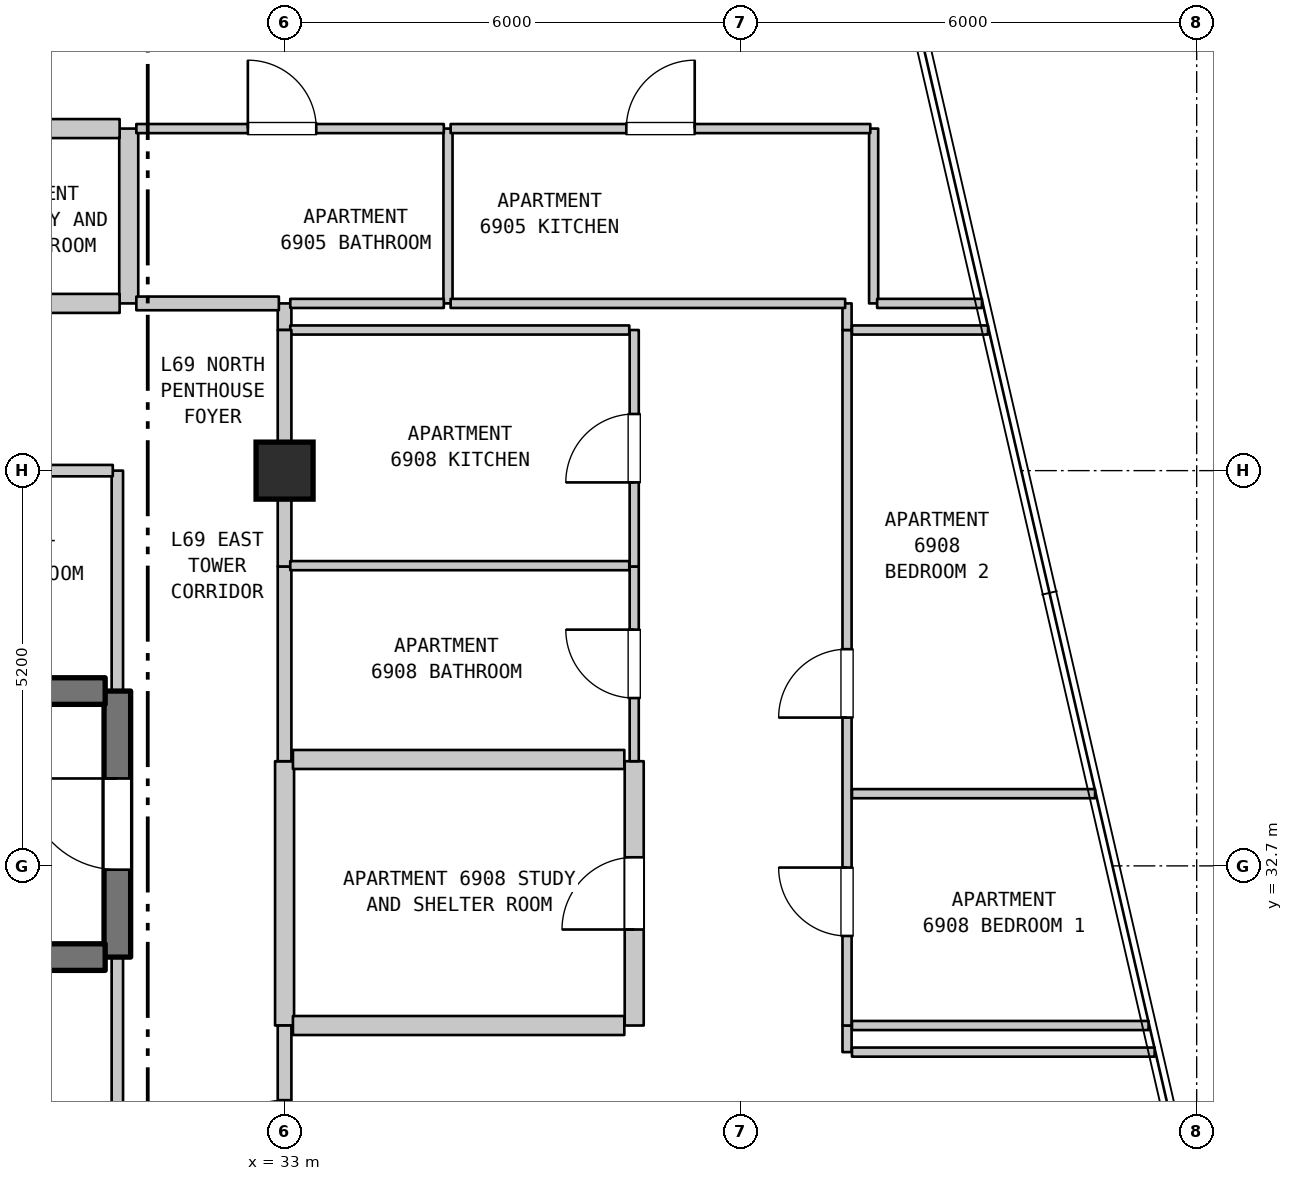
"""IFC4 building model, lengths in metres.
Left out: names, types, materials, properties, quantities, classifications, styles, units other than length and angle.
Written with IfcOpenShell. Run it as: python <this file> out.ifc"""

import sys

from ifc_helpers import new_model, si_unit, direction, frame, frame_2d, origin, origin_2d, place, context, subcontext, project, spatial, rectangle, extrude, element, fill, save


model = new_model("IFC4")
c1 = context("Model", 3, precision=1e-05, world=origin(), true_north=direction((0.0, 1.0)))
c2 = subcontext(c1, "Body", "Model", "MODEL_VIEW")
j1 = project(units=[si_unit("LENGTHUNIT", "METRE"), si_unit("PLANEANGLEUNIT", "RADIAN")], contexts=[c1])
p1 = place(None, origin())
s1 = spatial("IfcSite", under=j1, at=p1, CompositionType="ELEMENT")
p2 = place(p1, origin())
s2 = spatial("IfcBuilding", under=s1, at=p2, CompositionType="ELEMENT")
p3 = place(p2, frame((0.0, 0.0, 276.9)))
s3 = spatial("IfcBuildingStorey", under=s2, at=p3, CompositionType="ELEMENT", Elevation=276.9)
p4 = place(p3, frame((33.0, 37.9, 0.0), z_axis=(0.0, 0.0, 1.0), x_axis=(1.0, 0.0, 0.0)))
e1 = element("IfcColumn", 1, at=p4, inside=s3, PredefinedType="COLUMN", context=c2, shape_type="SweptSolid", body=[
    extrude(rectangle(XDim=0.75, YDim=0.75, at=origin_2d()), origin(), (0.0, 0.0, 1.0), 3.7),
])
p5 = place(p3, frame((30.8, 28.9, 0.0), z_axis=(0.0, 0.0, 1.0), x_axis=(0.0, 1.0, 0.0)))
e2 = element("IfcWall", 2, at=p5, inside=s3, PredefinedType="STANDARD", context=c2, shape_type="SweptSolid", body=[
    extrude(rectangle(XDim=2.6, YDim=0.15, at=frame_2d((1.3, 0.0))), origin(), (0.0, 0.0, 1.0), 3.39),
])
p6 = place(p3, frame((30.8, 31.5, 0.0), z_axis=(0.0, 0.0, 1.0), x_axis=(0.0, 1.0, 0.0)))
e3 = element("IfcWall", 3, at=p6, inside=s3, PredefinedType="SHEAR", context=c2, shape_type="SweptSolid", body=[
    extrude(rectangle(XDim=3.5, YDim=0.35, at=frame_2d((1.75, 0.0))), origin(), (0.0, 0.0, 1.0), 3.39),
])
p7 = place(p6, frame((1.15, 0.0, 0.0)))
e4 = element("IfcOpeningElement", 4, at=p7, cuts=e3, PredefinedType="OPENING", context=c2, shape_type="SweptSolid", body=[
    extrude(rectangle(XDim=1.2, YDim=2.2, at=frame_2d((0.6, 1.1))), frame((0.0, 0.185, 0.0), z_axis=(0.0, -1.0, 0.0), x_axis=(1.0, 0.0, 0.0)), (0.0, 0.0, 1.0), 0.37),
])
p8 = place(p3, frame((30.8, 35.0, 0.0), z_axis=(0.0, 0.0, 1.0), x_axis=(0.0, 1.0, 0.0)))
e5 = element("IfcWall", 5, at=p8, inside=s3, PredefinedType="STANDARD", context=c2, shape_type="SweptSolid", body=[
    extrude(rectangle(XDim=2.9, YDim=0.15, at=frame_2d((1.45, 0.0))), origin(), (0.0, 0.0, 1.0), 3.39),
])
p9 = place(p3, frame((30.95, 40.1, 0.0), z_axis=(0.0, 0.0, 1.0), x_axis=(0.0, 1.0, 0.0)))
e6 = element("IfcWall", 6, at=p9, inside=s3, PredefinedType="STANDARD", context=c2, shape_type="SweptSolid", body=[
    extrude(rectangle(XDim=2.3, YDim=0.25, at=frame_2d((1.15, 0.0))), origin(), (0.0, 0.0, 1.0), 3.39),
])
p10 = place(p3, frame((33.0, 30.6, 0.0), z_axis=(0.0, 0.0, 1.0), x_axis=(0.0, 1.0, 0.0)))
e7 = element("IfcWall", 7, at=p10, inside=s3, PredefinedType="STANDARD", context=c2, shape_type="SweptSolid", body=[
    extrude(rectangle(XDim=3.477, YDim=0.25, at=frame_2d((1.738, 0.0))), origin(), (0.0, 0.0, 1.0), 2.89),
])
p11 = place(p3, frame((33.0, 34.077, 0.0), z_axis=(0.0, 0.0, 1.0), x_axis=(0.0, 1.0, 0.0)))
e8 = element("IfcWall", 8, at=p11, inside=s3, PredefinedType="STANDARD", context=c2, shape_type="SweptSolid", body=[
    extrude(rectangle(XDim=2.562, YDim=0.18, at=frame_2d((1.281, 0.0))), origin(), (0.0, 0.0, 1.0), 2.89),
])
p12 = place(p3, frame((33.0, 36.639, 0.0), z_axis=(0.0, 0.0, 1.0), x_axis=(0.0, 1.0, 0.0)))
e9 = element("IfcWall", 9, at=p12, inside=s3, PredefinedType="STANDARD", context=c2, shape_type="SweptSolid", body=[
    extrude(rectangle(XDim=1.261, YDim=0.18, at=frame_2d((0.63, 0.0))), origin(), (0.0, 0.0, 1.0), 2.89),
])
p13 = place(p3, frame((33.0, 39.75, 0.0), z_axis=(0.0, 0.0, 1.0), x_axis=(0.0, 1.0, 0.0)))
e10 = element("IfcWall", 10, at=p13, inside=s3, PredefinedType="STANDARD", context=c2, shape_type="SweptSolid", body=[
    extrude(rectangle(XDim=0.35, YDim=0.18, at=frame_2d((0.175, 0.0))), origin(), (0.0, 0.0, 1.0), 3.39),
])
p14 = place(p3, frame((35.15, 40.1, 0.0), z_axis=(0.0, 0.0, 1.0), x_axis=(0.0, 1.0, 0.0)))
e11 = element("IfcWall", 11, at=p14, inside=s3, PredefinedType="PARTITIONING", context=c2, shape_type="SweptSolid", body=[
    extrude(rectangle(XDim=2.3, YDim=0.12, at=frame_2d((1.15, 0.0))), origin(), (0.0, 0.0, 1.0), 3.39),
])
p15 = place(p3, frame((37.6, 30.6, 0.0), z_axis=(0.0, 0.0, 1.0), x_axis=(0.0, 1.0, 0.0)))
e12 = element("IfcWall", 12, at=p15, inside=s3, PredefinedType="STANDARD", context=c2, shape_type="SweptSolid", body=[
    extrude(rectangle(XDim=3.477, YDim=0.25, at=frame_2d((1.738, 0.0))), origin(), (0.0, 0.0, 1.0), 3.39),
])
p16 = place(p15, frame((1.263, 0.0, 0.0)))
e13 = element("IfcOpeningElement", 13, at=p16, cuts=e12, PredefinedType="OPENING", context=c2, shape_type="SweptSolid", body=[
    extrude(rectangle(XDim=0.95, YDim=2.15, at=frame_2d((0.475, 1.075))), frame((0.0, 0.135, 0.0), z_axis=(0.0, -1.0, 0.0), x_axis=(1.0, 0.0, 0.0)), (0.0, 0.0, 1.0), 0.27),
])
p17 = place(p3, frame((37.6, 34.077, 0.0), z_axis=(0.0, 0.0, 1.0), x_axis=(0.0, 1.0, 0.0)))
e14 = element("IfcWall", 14, at=p17, inside=s3, PredefinedType="PARTITIONING", context=c2, shape_type="SweptSolid", body=[
    extrude(rectangle(XDim=2.562, YDim=0.12, at=frame_2d((1.281, 0.0))), origin(), (0.0, 0.0, 1.0), 3.39),
])
p18 = place(p17, frame((0.831, 0.0, 0.0)))
e15 = element("IfcOpeningElement", 15, at=p18, cuts=e14, PredefinedType="OPENING", context=c2, shape_type="SweptSolid", body=[
    extrude(rectangle(XDim=0.9, YDim=2.1, at=frame_2d((0.45, 1.05))), frame((0.0, 0.07, 0.0), z_axis=(0.0, -1.0, 0.0), x_axis=(1.0, 0.0, 0.0)), (0.0, 0.0, 1.0), 0.14),
])
p19 = place(p3, frame((37.6, 36.639, 0.0), z_axis=(0.0, 0.0, 1.0), x_axis=(0.0, 1.0, 0.0)))
e16 = element("IfcWall", 16, at=p19, inside=s3, PredefinedType="PARTITIONING", context=c2, shape_type="SweptSolid", body=[
    extrude(rectangle(XDim=3.111, YDim=0.12, at=frame_2d((1.556, 0.0))), origin(), (0.0, 0.0, 1.0), 3.39),
])
p20 = place(p19, frame((1.106, 0.0, 0.0)))
e17 = element("IfcOpeningElement", 17, at=p20, cuts=e16, PredefinedType="OPENING", context=c2, shape_type="SweptSolid", body=[
    extrude(rectangle(XDim=0.9, YDim=2.15, at=frame_2d((0.45, 1.075))), frame((0.0, 0.07, 0.0), z_axis=(0.0, -1.0, 0.0), x_axis=(1.0, 0.0, 0.0)), (0.0, 0.0, 1.0), 0.14),
])
p21 = place(p3, frame((40.4, 30.25, 0.0), z_axis=(0.0, 0.0, 1.0), x_axis=(0.0, 1.0, 0.0)))
e18 = element("IfcWall", 18, at=p21, inside=s3, PredefinedType="PARTITIONING", context=c2, shape_type="SweptSolid", body=[
    extrude(rectangle(XDim=0.35, YDim=0.12, at=frame_2d((0.175, 0.0))), origin(), (0.0, 0.0, 1.0), 3.39),
])
p22 = place(p3, frame((40.4, 30.6, 0.0), z_axis=(0.0, 0.0, 1.0), x_axis=(0.0, 1.0, 0.0)))
e19 = element("IfcWall", 19, at=p22, inside=s3, PredefinedType="PARTITIONING", context=c2, shape_type="SweptSolid", body=[
    extrude(rectangle(XDim=9.15, YDim=0.12, at=frame_2d((4.575, 0.0))), origin(), (0.0, 0.0, 1.0), 3.39),
])
p23 = place(p22, frame((1.178, 0.0, 0.0)))
e20 = element("IfcOpeningElement", 20, at=p23, cuts=e19, PredefinedType="OPENING", context=c2, shape_type="SweptSolid", body=[
    extrude(rectangle(XDim=0.9, YDim=2.15, at=frame_2d((0.45, 1.075))), frame((0.0, 0.07, 0.0), z_axis=(0.0, -1.0, 0.0), x_axis=(1.0, 0.0, 0.0)), (0.0, 0.0, 1.0), 0.14),
])
p24 = place(p22, frame((4.051, 0.0, 0.0)))
e21 = element("IfcOpeningElement", 21, at=p24, cuts=e19, PredefinedType="OPENING", context=c2, shape_type="SweptSolid", body=[
    extrude(rectangle(XDim=0.9, YDim=2.15, at=frame_2d((0.45, 1.075))), frame((0.0, 0.07, 0.0), z_axis=(0.0, -1.0, 0.0), x_axis=(1.0, 0.0, 0.0)), (0.0, 0.0, 1.0), 0.14),
])
p25 = place(p3, frame((40.4, 39.75, 0.0), z_axis=(0.0, 0.0, 1.0), x_axis=(0.0, 1.0, 0.0)))
e22 = element("IfcWall", 22, at=p25, inside=s3, PredefinedType="PARTITIONING", context=c2, shape_type="SweptSolid", body=[
    extrude(rectangle(XDim=0.35, YDim=0.12, at=frame_2d((0.175, 0.0))), origin(), (0.0, 0.0, 1.0), 3.39),
])
p26 = place(p3, frame((40.75, 40.1, 0.0), z_axis=(0.0, 0.0, 1.0), x_axis=(0.0, 1.0, 0.0)))
e23 = element("IfcWall", 23, at=p26, inside=s3, PredefinedType="PARTITIONING", context=c2, shape_type="SweptSolid", body=[
    extrude(rectangle(XDim=2.3, YDim=0.12, at=frame_2d((1.15, 0.0))), origin(), (0.0, 0.0, 1.0), 3.39),
])
p27 = place(p3, frame((40.465, 30.25, 0.0), z_axis=(0.0, 0.0, 1.0), x_axis=(1.0, 0.0, 0.0)))
e24 = element("IfcWall", 24, at=p27, inside=s3, PredefinedType="PARTITIONING", context=c2, shape_type="SweptSolid", body=[
    extrude(rectangle(XDim=3.982, YDim=0.12, at=frame_2d((1.991, 0.0))), origin(), (0.0, 0.0, 1.0), 3.39),
])
p28 = place(p3, frame((33.11, 30.6, 0.0), z_axis=(0.0, 0.0, 1.0), x_axis=(1.0, 0.0, 0.0)))
e25 = element("IfcWall", 25, at=p28, inside=s3, PredefinedType="STANDARD", context=c2, shape_type="SweptSolid", body=[
    extrude(rectangle(XDim=4.36, YDim=0.25, at=frame_2d((2.18, 0.0))), origin(), (0.0, 0.0, 1.0), 3.39),
])
p29 = place(p3, frame((40.465, 30.6, 0.0), z_axis=(0.0, 0.0, 1.0), x_axis=(1.0, 0.0, 0.0)))
e26 = element("IfcWall", 26, at=p29, inside=s3, PredefinedType="PARTITIONING", context=c2, shape_type="SweptSolid", body=[
    extrude(rectangle(XDim=3.902, YDim=0.12, at=frame_2d((1.951, 0.0))), origin(), (0.0, 0.0, 1.0), 3.39),
])
p30 = place(p3, frame((27.46, 31.5, 0.0), z_axis=(0.0, 0.0, 1.0), x_axis=(1.0, 0.0, 0.0)))
e27 = element("IfcWall", 27, at=p30, inside=s3, PredefinedType="SHEAR", context=c2, shape_type="SweptSolid", body=[
    extrude(rectangle(XDim=3.18, YDim=0.35, at=frame_2d((1.59, 0.0))), origin(), (0.0, 0.0, 1.0), 3.39),
])
p31 = place(p3, frame((40.465, 33.65, 0.0), z_axis=(0.0, 0.0, 1.0), x_axis=(1.0, 0.0, 0.0)))
e28 = element("IfcWall", 28, at=p31, inside=s3, PredefinedType="PARTITIONING", context=c2, shape_type="SweptSolid", body=[
    extrude(rectangle(XDim=3.198, YDim=0.12, at=frame_2d((1.599, 0.0))), origin(), (0.0, 0.0, 1.0), 3.39),
])
p32 = place(p3, frame((33.11, 34.1, 0.0), z_axis=(0.0, 0.0, 1.0), x_axis=(1.0, 0.0, 0.0)))
e29 = element("IfcWall", 29, at=p32, inside=s3, PredefinedType="STANDARD", context=c2, shape_type="SweptSolid", body=[
    extrude(rectangle(XDim=4.36, YDim=0.25, at=frame_2d((2.18, 0.0))), origin(), (0.0, 0.0, 1.0), 3.39),
])
p33 = place(p3, frame((26.645, 35.0, 0.0), z_axis=(0.0, 0.0, 1.0), x_axis=(1.0, 0.0, 0.0)))
e30 = element("IfcWall", 30, at=p33, inside=s3, PredefinedType="SHEAR", context=c2, shape_type="SweptSolid", body=[
    extrude(rectangle(XDim=3.995, YDim=0.35, at=frame_2d((1.998, 0.0))), origin(), (0.0, 0.0, 1.0), 3.39),
])
p34 = place(p33, frame((1.508, 0.0, 0.0)))
e31 = element("IfcOpeningElement", 31, at=p34, cuts=e30, PredefinedType="OPENING", context=c2, shape_type="SweptSolid", body=[
    extrude(rectangle(XDim=0.95, YDim=2.15, at=frame_2d((0.475, 1.075))), frame((0.0, 0.185, 0.0), z_axis=(0.0, -1.0, 0.0), x_axis=(1.0, 0.0, 0.0)), (0.0, 0.0, 1.0), 0.37),
])
p35 = place(p3, frame((33.075, 36.65, 0.0), z_axis=(0.0, 0.0, 1.0), x_axis=(1.0, 0.0, 0.0)))
e32 = element("IfcWall", 32, at=p35, inside=s3, PredefinedType="PARTITIONING", context=c2, shape_type="SweptSolid", body=[
    extrude(rectangle(XDim=4.46, YDim=0.12, at=frame_2d((2.23, 0.0))), origin(), (0.0, 0.0, 1.0), 3.39),
])
p36 = place(p3, frame((26.645, 37.9, 0.0), z_axis=(0.0, 0.0, 1.0), x_axis=(1.0, 0.0, 0.0)))
e33 = element("IfcWall", 33, at=p36, inside=s3, PredefinedType="STANDARD", context=c2, shape_type="SweptSolid", body=[
    extrude(rectangle(XDim=4.095, YDim=0.15, at=frame_2d((2.047, 0.0))), origin(), (0.0, 0.0, 1.0), 2.89),
])
p37 = place(p3, frame((33.075, 39.75, 0.0), z_axis=(0.0, 0.0, 1.0), x_axis=(1.0, 0.0, 0.0)))
e34 = element("IfcWall", 34, at=p37, inside=s3, PredefinedType="PARTITIONING", context=c2, shape_type="SweptSolid", body=[
    extrude(rectangle(XDim=4.46, YDim=0.12, at=frame_2d((2.23, 0.0))), origin(), (0.0, 0.0, 1.0), 3.39),
])
p38 = place(p3, frame((40.465, 39.75, 0.0), z_axis=(0.0, 0.0, 1.0), x_axis=(1.0, 0.0, 0.0)))
e35 = element("IfcWall", 35, at=p38, inside=s3, PredefinedType="PARTITIONING", context=c2, shape_type="SweptSolid", body=[
    extrude(rectangle(XDim=1.79, YDim=0.12, at=frame_2d((0.895, 0.0))), origin(), (0.0, 0.0, 1.0), 3.39),
])
p39 = place(p3, frame((25.86, 40.1, 0.0), z_axis=(0.0, 0.0, 1.0), x_axis=(1.0, 0.0, 0.0)))
e36 = element("IfcWall", 36, at=p39, inside=s3, PredefinedType="STANDARD", context=c2, shape_type="SweptSolid", body=[
    extrude(rectangle(XDim=4.97, YDim=0.25, at=frame_2d((2.485, 0.0))), origin(), (0.0, 0.0, 1.0), 3.39),
])
p40 = place(p3, frame((31.05, 40.1, 0.0), z_axis=(0.0, 0.0, 1.0), x_axis=(1.0, 0.0, 0.0)))
e37 = element("IfcWall", 37, at=p40, inside=s3, PredefinedType="STANDARD", context=c2, shape_type="SweptSolid", body=[
    extrude(rectangle(XDim=1.875, YDim=0.18, at=frame_2d((0.938, 0.0))), origin(), (0.0, 0.0, 1.0), 3.39),
])
p41 = place(p3, frame((33.075, 40.1, 0.0), z_axis=(0.0, 0.0, 1.0), x_axis=(1.0, 0.0, 0.0)))
e38 = element("IfcWall", 38, at=p41, inside=s3, PredefinedType="PARTITIONING", context=c2, shape_type="SweptSolid", body=[
    extrude(rectangle(XDim=2.02, YDim=0.12, at=frame_2d((1.01, 0.0))), origin(), (0.0, 0.0, 1.0), 3.39),
])
p42 = place(p3, frame((35.185, 40.1, 0.0), z_axis=(0.0, 0.0, 1.0), x_axis=(1.0, 0.0, 0.0)))
e39 = element("IfcWall", 39, at=p42, inside=s3, PredefinedType="PARTITIONING", context=c2, shape_type="SweptSolid", body=[
    extrude(rectangle(XDim=5.19, YDim=0.12, at=frame_2d((2.595, 0.0))), origin(), (0.0, 0.0, 1.0), 3.39),
])
p43 = place(p3, frame((40.796, 40.1, 0.0), z_axis=(0.0, 0.0, 1.0), x_axis=(1.0, 0.0, 0.0)))
e40 = element("IfcWall", 40, at=p43, inside=s3, PredefinedType="PARTITIONING", context=c2, shape_type="SweptSolid", body=[
    extrude(rectangle(XDim=1.379, YDim=0.12, at=frame_2d((0.689, 0.0))), origin(), (0.0, 0.0, 1.0), 3.39),
])
p44 = place(p3, frame((25.86, 42.4, 0.0), z_axis=(0.0, 0.0, 1.0), x_axis=(1.0, 0.0, 0.0)))
e41 = element("IfcWall", 41, at=p44, inside=s3, PredefinedType="STANDARD", context=c2, shape_type="SweptSolid", body=[
    extrude(rectangle(XDim=4.97, YDim=0.25, at=frame_2d((2.485, 0.0))), origin(), (0.0, 0.0, 1.0), 3.39),
])
p45 = place(p44, frame((2.01, 0.0, 0.0)))
e42 = element("IfcOpeningElement", 42, at=p45, cuts=e41, PredefinedType="OPENING", context=c2, shape_type="SweptSolid", body=[
    extrude(rectangle(XDim=0.95, YDim=2.15, at=frame_2d((0.475, 1.075))), frame((0.0, 0.135, 0.0), z_axis=(0.0, -1.0, 0.0), x_axis=(1.0, 0.0, 0.0)), (0.0, 0.0, 1.0), 0.27),
])
p46 = place(p3, frame((31.05, 42.4, 0.0), z_axis=(0.0, 0.0, 1.0), x_axis=(1.0, 0.0, 0.0)))
e43 = element("IfcWall", 43, at=p46, inside=s3, PredefinedType="PARTITIONING", context=c2, shape_type="SweptSolid", body=[
    extrude(rectangle(XDim=4.045, YDim=0.12, at=frame_2d((2.022, 0.0))), origin(), (0.0, 0.0, 1.0), 3.39),
])
p47 = place(p46, frame((1.467, 0.0, 0.0)))
e44 = element("IfcOpeningElement", 44, at=p47, cuts=e43, PredefinedType="OPENING", context=c2, shape_type="SweptSolid", body=[
    extrude(rectangle(XDim=0.9, YDim=2.1, at=frame_2d((0.45, 1.05))), frame((0.0, 0.07, 0.0), z_axis=(0.0, -1.0, 0.0), x_axis=(1.0, 0.0, 0.0)), (0.0, 0.0, 1.0), 0.14),
])
p48 = place(p3, frame((35.185, 42.4, 0.0), z_axis=(0.0, 0.0, 1.0), x_axis=(1.0, 0.0, 0.0)))
e45 = element("IfcWall", 45, at=p48, inside=s3, PredefinedType="PARTITIONING", context=c2, shape_type="SweptSolid", body=[
    extrude(rectangle(XDim=5.521, YDim=0.12, at=frame_2d((2.76, 0.0))), origin(), (0.0, 0.0, 1.0), 3.39),
])
p49 = place(p48, frame((2.311, 0.0, 0.0)))
e46 = element("IfcOpeningElement", 46, at=p49, cuts=e45, PredefinedType="OPENING", context=c2, shape_type="SweptSolid", body=[
    extrude(rectangle(XDim=0.9, YDim=2.15, at=frame_2d((0.45, 1.075))), frame((0.0, 0.07, 0.0), z_axis=(0.0, -1.0, 0.0), x_axis=(1.0, 0.0, 0.0)), (0.0, 0.0, 1.0), 0.14),
])
p50 = place(p3, frame((33.0, 27.9, 0.0), z_axis=(0.0, 0.0, 1.0), x_axis=(0.0, 1.0, 0.0)))
e47 = element("IfcWall", 47, at=p50, inside=s3, PredefinedType="STANDARD", context=c2, shape_type="SweptSolid", body=[
    extrude(rectangle(XDim=2.7, YDim=0.18, at=frame_2d((1.35, 0.0))), origin(), (0.0, 0.0, 1.0), 2.89),
])
p51 = place(p50, frame((0.718, 0.0, 0.0)))
e48 = element("IfcOpeningElement", 48, at=p51, cuts=e47, PredefinedType="OPENING", context=c2, shape_type="SweptSolid", body=[
    extrude(rectangle(XDim=1.0, YDim=2.15, at=frame_2d((0.5, 1.075))), frame((0.0, 0.1, 0.0), z_axis=(0.0, -1.0, 0.0), x_axis=(1.0, 0.0, 0.0)), (0.0, 0.0, 1.0), 0.2),
])
p52 = place(p3, frame((33.0, 37.9, 0.0), z_axis=(0.0, 0.0, 1.0), x_axis=(0.0, 1.0, 0.0)))
e49 = element("IfcWall", 49, at=p52, inside=s3, PredefinedType="STANDARD", context=c2, shape_type="SweptSolid", body=[
    extrude(rectangle(XDim=1.85, YDim=0.18, at=frame_2d((0.925, 0.0))), origin(), (0.0, 0.0, 1.0), 2.79),
])
p53 = place(p7, origin())
e50 = element("IfcDoor", 50, at=p53, inside=s3, OperationType="SINGLE_SWING_RIGHT", PredefinedType="DOOR", context=c2, shape_type="SweptSolid", body=[
    extrude(rectangle(XDim=1.2, YDim=2.2, at=frame_2d((0.6, 1.1))), frame((0.0, 0.025, 0.0), z_axis=(0.0, -1.0, 0.0), x_axis=(1.0, 0.0, 0.0)), (0.0, 0.0, 1.0), 0.05),
])
fill(e4, e50)
p54 = place(p51, origin())
e51 = element("IfcDoor", 51, at=p54, inside=s3, OperationType="SINGLE_SWING_LEFT", PredefinedType="DOOR", context=c2, shape_type="SweptSolid", body=[
    extrude(rectangle(XDim=1.0, YDim=2.15, at=frame_2d((0.5, 1.075))), frame((0.0, 0.025, 0.0), z_axis=(0.0, -1.0, 0.0), x_axis=(1.0, 0.0, 0.0)), (0.0, 0.0, 1.0), 0.05),
])
fill(e48, e51)
p55 = place(p16, origin())
e52 = element("IfcDoor", 52, at=p55, inside=s3, OperationType="SINGLE_SWING_LEFT", PredefinedType="DOOR", context=c2, shape_type="SweptSolid", body=[
    extrude(rectangle(XDim=0.95, YDim=2.15, at=frame_2d((0.475, 1.075))), frame((0.0, 0.025, 0.0), z_axis=(0.0, -1.0, 0.0), x_axis=(1.0, 0.0, 0.0)), (0.0, 0.0, 1.0), 0.05),
])
fill(e13, e52)
p56 = place(p18, origin())
e53 = element("IfcDoor", 53, at=p56, inside=s3, OperationType="SINGLE_SWING_RIGHT", PredefinedType="DOOR", context=c2, shape_type="SweptSolid", body=[
    extrude(rectangle(XDim=0.9, YDim=2.1, at=frame_2d((0.45, 1.05))), frame((0.0, 0.025, 0.0), z_axis=(0.0, -1.0, 0.0), x_axis=(1.0, 0.0, 0.0)), (0.0, 0.0, 1.0), 0.05),
])
fill(e15, e53)
p57 = place(p20, origin())
e54 = element("IfcDoor", 54, at=p57, inside=s3, OperationType="SINGLE_SWING_LEFT", PredefinedType="DOOR", context=c2, shape_type="SweptSolid", body=[
    extrude(rectangle(XDim=0.9, YDim=2.15, at=frame_2d((0.45, 1.075))), frame((0.0, 0.025, 0.0), z_axis=(0.0, -1.0, 0.0), x_axis=(1.0, 0.0, 0.0)), (0.0, 0.0, 1.0), 0.05),
])
fill(e17, e54)
p58 = place(p23, origin())
e55 = element("IfcDoor", 55, at=p58, inside=s3, OperationType="SINGLE_SWING_RIGHT", PredefinedType="DOOR", context=c2, shape_type="SweptSolid", body=[
    extrude(rectangle(XDim=0.9, YDim=2.15, at=frame_2d((0.45, 1.075))), frame((0.0, 0.025, 0.0), z_axis=(0.0, -1.0, 0.0), x_axis=(1.0, 0.0, 0.0)), (0.0, 0.0, 1.0), 0.05),
])
fill(e20, e55)
p59 = place(p24, origin())
e56 = element("IfcDoor", 56, at=p59, inside=s3, OperationType="SINGLE_SWING_LEFT", PredefinedType="DOOR", context=c2, shape_type="SweptSolid", body=[
    extrude(rectangle(XDim=0.9, YDim=2.15, at=frame_2d((0.45, 1.075))), frame((0.0, 0.025, 0.0), z_axis=(0.0, -1.0, 0.0), x_axis=(1.0, 0.0, 0.0)), (0.0, 0.0, 1.0), 0.05),
])
fill(e21, e56)
p60 = place(p47, origin())
e57 = element("IfcDoor", 57, at=p60, inside=s3, OperationType="SINGLE_SWING_LEFT", PredefinedType="DOOR", context=c2, shape_type="SweptSolid", body=[
    extrude(rectangle(XDim=0.9, YDim=2.1, at=frame_2d((0.45, 1.05))), frame((0.0, 0.025, 0.0), z_axis=(0.0, -1.0, 0.0), x_axis=(1.0, 0.0, 0.0)), (0.0, 0.0, 1.0), 0.05),
])
fill(e44, e57)
p61 = place(p49, origin())
e58 = element("IfcDoor", 58, at=p61, inside=s3, OperationType="SINGLE_SWING_RIGHT", PredefinedType="DOOR", context=c2, shape_type="SweptSolid", body=[
    extrude(rectangle(XDim=0.9, YDim=2.15, at=frame_2d((0.45, 1.075))), frame((0.0, 0.025, 0.0), z_axis=(0.0, -1.0, 0.0), x_axis=(1.0, 0.0, 0.0)), (0.0, 0.0, 1.0), 0.05),
])
fill(e46, e58)
save(model, sys.argv[1])
